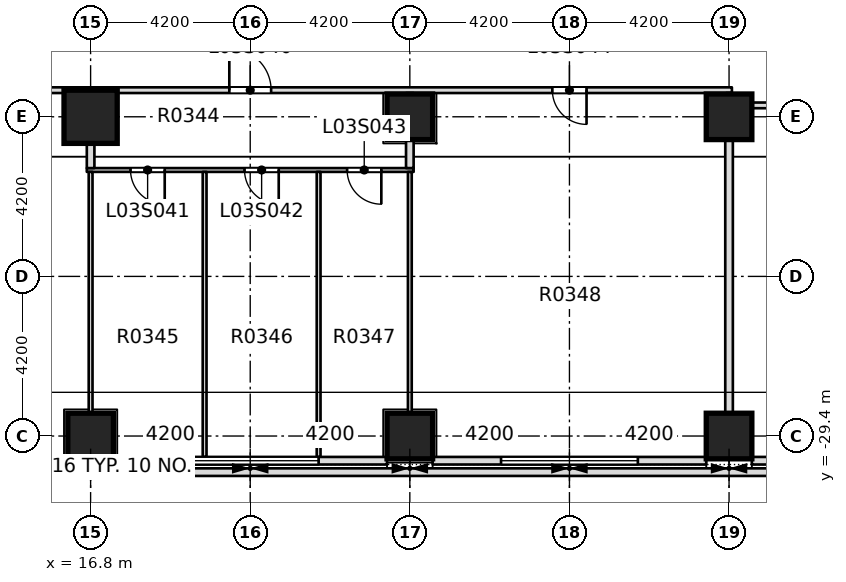
"""IFC4 building model, lengths in metres.
Left out: names, types, materials, properties, quantities, classifications, styles, units other than length and angle.
Written with IfcOpenShell. Run it as: python <this file> out.ifc"""

import sys

from ifc_helpers import new_model, si_unit, direction, frame, frame_2d, origin, origin_2d, place, context, subcontext, project, spatial, rectangle, extrude, element, fill, save


model = new_model("IFC4")
c1 = context("Model", 3, precision=1e-05, world=origin(), true_north=direction((0.0, 1.0)))
c2 = subcontext(c1, "Body", "Model", "MODEL_VIEW")
j1 = project(units=[si_unit("LENGTHUNIT", "METRE"), si_unit("PLANEANGLEUNIT", "RADIAN")], contexts=[c1])
p1 = place(None, origin())
s1 = spatial("IfcSite", under=j1, at=p1, CompositionType="ELEMENT")
p2 = place(p1, origin())
s2 = spatial("IfcBuilding", under=s1, at=p2, CompositionType="ELEMENT")
p3 = place(p2, frame((0.0, 0.0, 20.0)))
s3 = spatial("IfcBuildingStorey", under=s2, at=p3, CompositionType="ELEMENT", Elevation=20.0)
p4 = place(p3, frame((16.8, -21.0, -0.4), z_axis=(0.0, 0.0, 1.0), x_axis=(1.0, 0.0, 0.0)))
e1 = element("IfcColumn", 1, at=p4, inside=s3, PredefinedType="COLUMN", context=c2, shape_type="SweptSolid", body=[
    extrude(rectangle(XDim=1.4, YDim=1.4, at=origin_2d()), origin(), (0.0, 0.0, 1.0), 5.0),
])
for number, where, z_axis, x_axis in (
    (2, (16.8, -29.4, 0.0), (0.0, 0.0, 1.0), (1.0, 0.0, 0.0)),
    (3, (25.2, -29.4, 0.0), (0.0, 0.0, 1.0), (1.0, 0.0, 0.0)),
):
    element("IfcColumn", number, at=place(p3, frame(where, z_axis=z_axis, x_axis=x_axis)), inside=s3, PredefinedType="COLUMN", context=c2, shape_type="SweptSolid", body=[
        extrude(rectangle(XDim=1.2, YDim=1.2, at=origin_2d()), origin(), (0.0, 0.0, 1.0), 4.6),
    ])
for number, where, z_axis, x_axis in (
    (4, (33.6, -29.4, -0.4), (0.0, 0.0, 1.0), (1.0, 0.0, 0.0)),
    (5, (25.2, -21.0, 0.0), (0.0, 0.0, 1.0), (1.0, 0.0, 0.0)),
):
    element("IfcColumn", number, at=place(p3, frame(where, z_axis=z_axis, x_axis=x_axis)), inside=s3, PredefinedType="COLUMN", context=c2, shape_type="SweptSolid", body=[
        extrude(rectangle(XDim=1.2, YDim=1.2, at=origin_2d()), origin(), (0.0, 0.0, 1.0), 5.0),
    ])
p5 = place(p3, frame((33.6, -21.0, -0.4), z_axis=(0.0, 0.0, 1.0), x_axis=(1.0, 0.0, 0.0)))
e6 = element("IfcColumn", 6, at=p5, inside=s3, PredefinedType="COLUMN", context=c2, shape_type="SweptSolid", body=[
    extrude(rectangle(XDim=1.2, YDim=1.2, at=origin_2d()), origin(), (0.0, 0.0, 1.0), 5.4),
])
p6 = place(p3, frame((-26.25, -30.35, 5.0), z_axis=(0.0, 0.0, 1.0), x_axis=(1.0, 0.0, 0.0)))
e7 = element("IfcWall", 7, at=p6, inside=s3, PredefinedType="PARAPET", context=c2, shape_type="SweptSolid", body=[
    extrude(rectangle(XDim=77.7, YDim=0.2, at=frame_2d((38.85, 0.0))), origin(), (0.0, 0.0, 1.0), 1.2),
])
p7 = place(p3, frame((16.7, -22.4, 0.0), z_axis=(0.0, 0.0, 1.0), x_axis=(1.0, 0.0, 0.0)))
e8 = element("IfcWall", 8, at=p7, inside=s3, PredefinedType="PARTITIONING", context=c2, shape_type="SweptSolid", body=[
    extrude(rectangle(XDim=8.6, YDim=0.1, at=frame_2d((4.3, 0.0))), origin(), (0.0, 0.0, 1.0), 4.6),
])
p8 = place(p7, frame((1.15, 0.0, 0.0)))
e9 = element("IfcOpeningElement", 9, at=p8, cuts=e8, PredefinedType="OPENING", context=c2, shape_type="SweptSolid", body=[
    extrude(rectangle(XDim=0.9, YDim=2.1, at=frame_2d((0.45, 1.05))), frame((0.0, 0.06, 0.0), z_axis=(0.0, -1.0, 0.0), x_axis=(1.0, 0.0, 0.0)), (0.0, 0.0, 1.0), 0.12),
])
p9 = place(p7, frame((4.15, 0.0, 0.0)))
e10 = element("IfcOpeningElement", 10, at=p9, cuts=e8, PredefinedType="OPENING", context=c2, shape_type="SweptSolid", body=[
    extrude(rectangle(XDim=0.9, YDim=2.1, at=frame_2d((0.45, 1.05))), frame((0.0, 0.06, 0.0), z_axis=(0.0, -1.0, 0.0), x_axis=(1.0, 0.0, 0.0)), (0.0, 0.0, 1.0), 0.12),
])
p10 = place(p7, frame((6.85, 0.0, 0.0)))
e11 = element("IfcOpeningElement", 11, at=p10, cuts=e8, PredefinedType="OPENING", context=c2, shape_type="SweptSolid", body=[
    extrude(rectangle(XDim=0.9, YDim=2.1, at=frame_2d((0.45, 1.05))), frame((0.0, 0.06, 0.0), z_axis=(0.0, -1.0, 0.0), x_axis=(1.0, 0.0, 0.0)), (0.0, 0.0, 1.0), 0.12),
])
p11 = place(p3, frame((33.5, -20.7, 0.0), z_axis=(0.0, 0.0, 1.0), x_axis=(1.0, 0.0, 0.0)))
e12 = element("IfcWall", 12, at=p11, inside=s3, PredefinedType="PARTITIONING", context=c2, shape_type="SweptSolid", body=[
    extrude(rectangle(XDim=16.975, YDim=0.15, at=frame_2d((8.488, 0.0))), origin(), (0.0, 0.0, 1.0), 4.6),
])
p12 = place(p11, frame((9.2, 0.0, 0.0)))
e13 = element("IfcOpeningElement", 13, at=p12, cuts=e12, PredefinedType="OPENING", context=c2, shape_type="SweptSolid", body=[
    extrude(rectangle(XDim=0.9, YDim=2.1, at=frame_2d((0.45, 1.05))), frame((0.0, 0.085, 0.0), z_axis=(0.0, -1.0, 0.0), x_axis=(1.0, 0.0, 0.0)), (0.0, 0.0, 1.0), 0.17),
])
p13 = place(p3, frame((-25.75, -20.3, 0.0), z_axis=(0.0, 0.0, 1.0), x_axis=(1.0, 0.0, 0.0)))
e14 = element("IfcWall", 14, at=p13, inside=s3, PredefinedType="PARTITIONING", context=c2, shape_type="SweptSolid", body=[
    extrude(rectangle(XDim=59.425, YDim=0.15, at=frame_2d((29.712, 0.0))), origin(), (0.0, 0.0, 1.0), 4.6),
])
p14 = place(p13, frame((4.2, 0.0, 0.0)))
e15 = element("IfcOpeningElement", 15, at=p14, cuts=e14, PredefinedType="OPENING", context=c2, shape_type="SweptSolid", body=[
    extrude(rectangle(XDim=1.1, YDim=2.1, at=frame_2d((0.55, 1.05))), frame((0.0, 0.085, 0.0), z_axis=(0.0, -1.0, 0.0), x_axis=(1.0, 0.0, 0.0)), (0.0, 0.0, 1.0), 0.17),
])
p15 = place(p13, frame((12.35, 0.0, 0.0)))
e16 = element("IfcOpeningElement", 16, at=p15, cuts=e14, PredefinedType="OPENING", context=c2, shape_type="SweptSolid", body=[
    extrude(rectangle(XDim=0.9, YDim=2.1, at=frame_2d((0.45, 1.05))), frame((0.0, 0.085, 0.0), z_axis=(0.0, -1.0, 0.0), x_axis=(1.0, 0.0, 0.0)), (0.0, 0.0, 1.0), 0.17),
])
p16 = place(p13, frame((21.1, 0.0, 0.0)))
e17 = element("IfcOpeningElement", 17, at=p16, cuts=e14, PredefinedType="OPENING", context=c2, shape_type="SweptSolid", body=[
    extrude(rectangle(XDim=0.9, YDim=2.1, at=frame_2d((0.45, 1.05))), frame((0.0, 0.085, 0.0), z_axis=(0.0, -1.0, 0.0), x_axis=(1.0, 0.0, 0.0)), (0.0, 0.0, 1.0), 0.17),
])
p17 = place(p13, frame((32.2, 0.0, 0.0)))
e18 = element("IfcOpeningElement", 18, at=p17, cuts=e14, PredefinedType="OPENING", context=c2, shape_type="SweptSolid", body=[
    extrude(rectangle(XDim=1.2, YDim=2.1, at=frame_2d((0.6, 1.05))), frame((0.0, 0.085, 0.0), z_axis=(0.0, -1.0, 0.0), x_axis=(1.0, 0.0, 0.0)), (0.0, 0.0, 1.0), 0.17),
])
p18 = place(p13, frame((46.2, 0.0, 0.0)))
e19 = element("IfcOpeningElement", 19, at=p18, cuts=e14, PredefinedType="OPENING", context=c2, shape_type="SweptSolid", body=[
    extrude(rectangle(XDim=1.1, YDim=2.1, at=frame_2d((0.55, 1.05))), frame((0.0, 0.085, 0.0), z_axis=(0.0, -1.0, 0.0), x_axis=(1.0, 0.0, 0.0)), (0.0, 0.0, 1.0), 0.17),
])
p19 = place(p13, frame((54.7, 0.0, 0.0)))
e20 = element("IfcOpeningElement", 20, at=p19, cuts=e14, PredefinedType="OPENING", context=c2, shape_type="SweptSolid", body=[
    extrude(rectangle(XDim=0.9, YDim=2.1, at=frame_2d((0.45, 1.05))), frame((0.0, 0.085, 0.0), z_axis=(0.0, -1.0, 0.0), x_axis=(1.0, 0.0, 0.0)), (0.0, 0.0, 1.0), 0.17),
])
p20 = place(p3, frame((16.8, -29.95, 0.0), z_axis=(0.0, 0.0, 1.0), x_axis=(0.0, 1.0, 0.0)))
e21 = element("IfcWall", 21, at=p20, inside=s3, PredefinedType="PARTITIONING", context=c2, shape_type="SweptSolid", body=[
    extrude(rectangle(XDim=7.5, YDim=0.1, at=frame_2d((3.75, 0.0))), origin(), (0.0, 0.0, 1.0), 4.6),
])
p21 = place(p3, frame((16.8, -22.35, 0.0), z_axis=(0.0, 0.0, 1.0), x_axis=(0.0, 1.0, 0.0)))
e22 = element("IfcWall", 22, at=p21, inside=s3, PredefinedType="PARTITIONING", context=c2, shape_type="SweptSolid", body=[
    extrude(rectangle(XDim=1.975, YDim=0.2, at=frame_2d((0.988, 0.0))), origin(), (0.0, 0.0, 1.0), 4.6),
])
for number, where, z_axis, x_axis in (
    (23, (19.8, -29.95, 0.0), (0.0, 0.0, 1.0), (0.0, 1.0, 0.0)),
    (24, (22.8, -29.95, 0.0), (0.0, 0.0, 1.0), (0.0, 1.0, 0.0)),
    (25, (25.2, -29.95, 0.0), (0.0, 0.0, 1.0), (0.0, 1.0, 0.0)),
):
    element("IfcWall", number, at=place(p3, frame(where, z_axis=z_axis, x_axis=x_axis)), inside=s3, PredefinedType="PARTITIONING", context=c2, shape_type="SweptSolid", body=[
        extrude(rectangle(XDim=7.5, YDim=0.1, at=frame_2d((3.75, 0.0))), origin(), (0.0, 0.0, 1.0), 4.6),
    ])
p22 = place(p3, frame((25.2, -22.35, 0.0), z_axis=(0.0, 0.0, 1.0), x_axis=(0.0, 1.0, 0.0)))
e26 = element("IfcWall", 26, at=p22, inside=s3, PredefinedType="PARTITIONING", context=c2, shape_type="SweptSolid", body=[
    extrude(rectangle(XDim=1.975, YDim=0.2, at=frame_2d((0.988, 0.0))), origin(), (0.0, 0.0, 1.0), 4.6),
])
p23 = place(p3, frame((33.6, -29.95, 0.0), z_axis=(0.0, 0.0, 1.0), x_axis=(0.0, 1.0, 0.0)))
e27 = element("IfcWall", 27, at=p23, inside=s3, PredefinedType="PARTITIONING", context=c2, shape_type="SweptSolid", body=[
    extrude(rectangle(XDim=9.175, YDim=0.2, at=frame_2d((4.587, 0.0))), origin(), (0.0, 0.0, 1.0), 4.6),
])
p24 = place(p3, frame((33.6, -20.625, 0.0), z_axis=(0.0, 0.0, 1.0), x_axis=(0.0, 1.0, 0.0)))
e28 = element("IfcWall", 28, at=p24, inside=s3, PredefinedType="PARTITIONING", context=c2, shape_type="SweptSolid", body=[
    extrude(rectangle(XDim=0.25, YDim=0.15, at=frame_2d((0.125, 0.0))), origin(), (0.0, 0.0, 1.0), 4.6),
])
p25 = place(p3, frame((9.0, -30.05, 0.0), z_axis=(0.0, 0.0, 1.0), x_axis=(1.0, 0.0, 0.0)))
e29 = element("IfcWall", 29, at=p25, inside=s3, PredefinedType="STANDARD", context=c2, shape_type="SweptSolid", body=[
    extrude(rectangle(XDim=7.2, YDim=0.2, at=frame_2d((3.6, 0.0))), origin(), (0.0, 0.0, 1.0), 4.6),
])
p26 = place(p25, frame((1.8, 0.0, 0.9)))
e30 = element("IfcOpeningElement", 30, at=p26, cuts=e29, PredefinedType="OPENING", context=c2, shape_type="SweptSolid", body=[
    extrude(rectangle(XDim=3.6, YDim=2.8, at=frame_2d((1.8, 1.4))), frame((0.0, 0.11, 0.0), z_axis=(0.0, -1.0, 0.0), x_axis=(1.0, 0.0, 0.0)), (0.0, 0.0, 1.0), 0.22),
])
p27 = place(p3, frame((17.4, -30.05, 0.0), z_axis=(0.0, 0.0, 1.0), x_axis=(1.0, 0.0, 0.0)))
e31 = element("IfcWall", 31, at=p27, inside=s3, PredefinedType="STANDARD", context=c2, shape_type="SweptSolid", body=[
    extrude(rectangle(XDim=7.2, YDim=0.2, at=frame_2d((3.6, 0.0))), origin(), (0.0, 0.0, 1.0), 4.6),
])
p28 = place(p27, frame((1.8, 0.0, 0.9)))
e32 = element("IfcOpeningElement", 32, at=p28, cuts=e31, PredefinedType="OPENING", context=c2, shape_type="SweptSolid", body=[
    extrude(rectangle(XDim=3.6, YDim=2.8, at=frame_2d((1.8, 1.4))), frame((0.0, 0.11, 0.0), z_axis=(0.0, -1.0, 0.0), x_axis=(1.0, 0.0, 0.0)), (0.0, 0.0, 1.0), 0.22),
])
p29 = place(p3, frame((25.8, -30.05, 0.0), z_axis=(0.0, 0.0, 1.0), x_axis=(1.0, 0.0, 0.0)))
e33 = element("IfcWall", 33, at=p29, inside=s3, PredefinedType="STANDARD", context=c2, shape_type="SweptSolid", body=[
    extrude(rectangle(XDim=7.2, YDim=0.2, at=frame_2d((3.6, 0.0))), origin(), (0.0, 0.0, 1.0), 4.6),
])
p30 = place(p29, frame((1.8, 0.0, 0.9)))
e34 = element("IfcOpeningElement", 34, at=p30, cuts=e33, PredefinedType="OPENING", context=c2, shape_type="SweptSolid", body=[
    extrude(rectangle(XDim=3.6, YDim=2.8, at=frame_2d((1.8, 1.4))), frame((0.0, 0.11, 0.0), z_axis=(0.0, -1.0, 0.0), x_axis=(1.0, 0.0, 0.0)), (0.0, 0.0, 1.0), 0.22),
])
p31 = place(p3, frame((34.2, -30.05, 0.0), z_axis=(0.0, 0.0, 1.0), x_axis=(1.0, 0.0, 0.0)))
e35 = element("IfcWall", 35, at=p31, inside=s3, PredefinedType="STANDARD", context=c2, shape_type="SweptSolid", body=[
    extrude(rectangle(XDim=7.2, YDim=0.2, at=frame_2d((3.6, 0.0))), origin(), (0.0, 0.0, 1.0), 4.6),
])
p32 = place(p31, frame((1.8, 0.0, 0.9)))
e36 = element("IfcOpeningElement", 36, at=p32, cuts=e35, PredefinedType="OPENING", context=c2, shape_type="SweptSolid", body=[
    extrude(rectangle(XDim=3.6, YDim=2.8, at=frame_2d((1.8, 1.4))), frame((0.0, 0.11, 0.0), z_axis=(0.0, -1.0, 0.0), x_axis=(1.0, 0.0, 0.0)), (0.0, 0.0, 1.0), 0.22),
])
p33 = place(p18, origin())
e37 = element("IfcDoor", 37, at=p33, inside=s3, OperationType="SINGLE_SWING_RIGHT", PredefinedType="DOOR", context=c2, shape_type="SweptSolid", body=[
    extrude(rectangle(XDim=1.1, YDim=2.1, at=frame_2d((0.55, 1.05))), frame((0.0, 0.025, 0.0), z_axis=(0.0, -1.0, 0.0), x_axis=(1.0, 0.0, 0.0)), (0.0, 0.0, 1.0), 0.05),
])
fill(e19, e37)
p34 = place(p8, origin())
e38 = element("IfcDoor", 38, at=p34, inside=s3, OperationType="SINGLE_SWING_RIGHT", PredefinedType="DOOR", context=c2, shape_type="SweptSolid", body=[
    extrude(rectangle(XDim=0.9, YDim=2.1, at=frame_2d((0.45, 1.05))), frame((0.0, 0.025, 0.0), z_axis=(0.0, -1.0, 0.0), x_axis=(1.0, 0.0, 0.0)), (0.0, 0.0, 1.0), 0.05),
])
fill(e9, e38)
p35 = place(p9, origin())
e39 = element("IfcDoor", 39, at=p35, inside=s3, OperationType="SINGLE_SWING_RIGHT", PredefinedType="DOOR", context=c2, shape_type="SweptSolid", body=[
    extrude(rectangle(XDim=0.9, YDim=2.1, at=frame_2d((0.45, 1.05))), frame((0.0, 0.025, 0.0), z_axis=(0.0, -1.0, 0.0), x_axis=(1.0, 0.0, 0.0)), (0.0, 0.0, 1.0), 0.05),
])
fill(e10, e39)
p36 = place(p10, origin())
e40 = element("IfcDoor", 40, at=p36, inside=s3, OperationType="SINGLE_SWING_RIGHT", PredefinedType="DOOR", context=c2, shape_type="SweptSolid", body=[
    extrude(rectangle(XDim=0.9, YDim=2.1, at=frame_2d((0.45, 1.05))), frame((0.0, 0.025, 0.0), z_axis=(0.0, -1.0, 0.0), x_axis=(1.0, 0.0, 0.0)), (0.0, 0.0, 1.0), 0.05),
])
fill(e11, e40)
p37 = place(p19, origin())
e41 = element("IfcDoor", 41, at=p37, inside=s3, OperationType="SINGLE_SWING_RIGHT", PredefinedType="DOOR", context=c2, shape_type="SweptSolid", body=[
    extrude(rectangle(XDim=0.9, YDim=2.1, at=frame_2d((0.45, 1.05))), frame((0.0, 0.025, 0.0), z_axis=(0.0, -1.0, 0.0), x_axis=(1.0, 0.0, 0.0)), (0.0, 0.0, 1.0), 0.05),
])
fill(e20, e41)
p38 = place(p28, origin())
e42 = element("IfcWindow", 42, at=p38, inside=s3, PartitioningType="SINGLE_PANEL", PredefinedType="WINDOW", context=c2, shape_type="SweptSolid", body=[
    extrude(rectangle(XDim=3.6, YDim=2.8, at=frame_2d((1.8, 1.4))), frame((0.0, 0.03, 0.0), z_axis=(0.0, -1.0, 0.0), x_axis=(1.0, 0.0, 0.0)), (0.0, 0.0, 1.0), 0.06),
])
fill(e32, e42)
p39 = place(p30, origin())
e43 = element("IfcWindow", 43, at=p39, inside=s3, PartitioningType="SINGLE_PANEL", PredefinedType="WINDOW", context=c2, shape_type="SweptSolid", body=[
    extrude(rectangle(XDim=3.6, YDim=2.8, at=frame_2d((1.8, 1.4))), frame((0.0, 0.03, 0.0), z_axis=(0.0, -1.0, 0.0), x_axis=(1.0, 0.0, 0.0)), (0.0, 0.0, 1.0), 0.06),
])
fill(e34, e43)
save(model, sys.argv[1])
